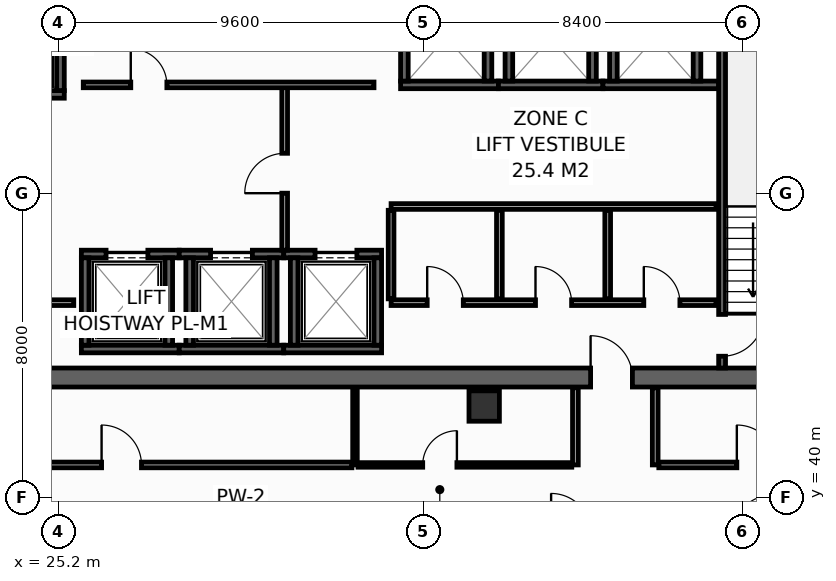
"""IFC4 building model, lengths in metres.
Left out: names, types, materials, properties, quantities, classifications, styles, units other than length and angle.
Written with IfcOpenShell. Run it as: python <this file> out.ifc"""

import sys

from ifc_helpers import new_model, si_unit, direction, frame, frame_2d, origin, origin_2d, place, context, subcontext, project, spatial, rectangle, hollow_rectangle, extrude, element, fill, save


model = new_model("IFC4")
c1 = context("Model", 3, precision=1e-05, world=origin(), true_north=direction((0.0, 1.0)))
c2 = subcontext(c1, "Body", "Model", "MODEL_VIEW")
j1 = project(units=[si_unit("LENGTHUNIT", "METRE"), si_unit("PLANEANGLEUNIT", "RADIAN")], contexts=[c1])
p1 = place(None, origin())
s1 = spatial("IfcSite", under=j1, at=p1, CompositionType="ELEMENT")
p2 = place(p1, origin())
s2 = spatial("IfcBuilding", under=s1, at=p2, CompositionType="ELEMENT")
p3 = place(p2, frame((0.0, 0.0, 205.6)))
s3 = spatial("IfcBuildingStorey", under=s2, at=p3, CompositionType="ELEMENT", Elevation=205.6)
p4 = place(p3, frame((13.6, 43.15, 0.0), z_axis=(0.0, 0.0, 1.0), x_axis=(1.0, 0.0, 0.0)))
e1 = element("IfcWall", 1, at=p4, inside=s3, PredefinedType="SHEAR", context=c2, shape_type="SweptSolid", body=[
    extrude(rectangle(XDim=32.7, YDim=0.5, at=frame_2d((16.35, 0.0))), origin(), (0.0, 0.0, 1.0), 3.55),
])
p5 = place(p4, frame((5.4, 0.0, 0.0)))
e2 = element("IfcOpeningElement", 2, at=p5, cuts=e1, PredefinedType="OPENING", context=c2, shape_type="SweptSolid", body=[
    extrude(rectangle(XDim=1.1, YDim=2.15, at=frame_2d((0.55, 1.075))), frame((0.0, 0.26, 0.0), z_axis=(0.0, -1.0, 0.0), x_axis=(1.0, 0.0, 0.0)), (0.0, 0.0, 1.0), 0.52),
])
p6 = place(p4, frame((25.6, 0.0, 0.0)))
e3 = element("IfcOpeningElement", 3, at=p6, cuts=e1, PredefinedType="OPENING", context=c2, shape_type="SweptSolid", body=[
    extrude(rectangle(XDim=1.1, YDim=2.15, at=frame_2d((0.55, 1.075))), frame((0.0, 0.26, 0.0), z_axis=(0.0, -1.0, 0.0), x_axis=(1.0, 0.0, 0.0)), (0.0, 0.0, 1.0), 0.52),
])
p7 = place(p3, frame((36.4, 42.4, 0.0), z_axis=(0.0, 0.0, 1.0), x_axis=(1.0, 0.0, 0.0)))
e4 = element("IfcColumn", 4, at=p7, inside=s3, PredefinedType="COLUMN", context=c2, shape_type="SweptSolid", body=[
    extrude(hollow_rectangle(XDim=0.8, YDim=0.8, WallThickness=0.036, at=origin_2d()), origin(), (0.0, 0.0, 1.0), 3.8),
])
p8 = place(p3, frame((22.5, 50.6, 0.0), z_axis=(0.0, 0.0, 1.0), x_axis=(1.0, 0.0, 0.0)))
e5 = element("IfcWall", 5, at=p8, inside=s3, PredefinedType="SHEAR", context=c2, shape_type="SweptSolid", body=[
    extrude(rectangle(XDim=2.85, YDim=0.2, at=frame_2d((1.425, 0.0))), origin(), (0.0, 0.0, 1.0), 3.55),
])
p9 = place(p8, frame((0.925, 0.0, 0.0)))
e6 = element("IfcOpeningElement", 6, at=p9, cuts=e5, PredefinedType="OPENING", context=c2, shape_type="SweptSolid", body=[
    extrude(rectangle(XDim=1.25, YDim=2.3, at=frame_2d((0.625, 1.15))), frame((0.0, 0.11, 0.0), z_axis=(0.0, -1.0, 0.0), x_axis=(1.0, 0.0, 0.0)), (0.0, 0.0, 1.0), 0.22),
])
p10 = place(p3, frame((25.25, 50.7, 0.0), z_axis=(0.0, 0.0, 1.0), x_axis=(0.0, 1.0, 0.0)))
e7 = element("IfcWall", 7, at=p10, inside=s3, PredefinedType="SHEAR", context=c2, shape_type="SweptSolid", body=[
    extrude(rectangle(XDim=2.6, YDim=0.2, at=frame_2d((1.3, 0.0))), origin(), (0.0, 0.0, 1.0), 3.55),
])
p11 = place(p3, frame((25.8, 43.9, 0.0), z_axis=(0.0, 0.0, 1.0), x_axis=(1.0, 0.0, 0.0)))
e8 = element("IfcWall", 8, at=p11, inside=s3, PredefinedType="SHEAR", context=c2, shape_type="SweptSolid", body=[
    extrude(rectangle(XDim=2.575, YDim=0.2, at=frame_2d((1.288, 0.0))), origin(), (0.0, 0.0, 1.0), 3.55),
])
p12 = place(p3, frame((25.8, 46.4, 0.0), z_axis=(0.0, 0.0, 1.0), x_axis=(1.0, 0.0, 0.0)))
e9 = element("IfcWall", 9, at=p12, inside=s3, PredefinedType="SHEAR", context=c2, shape_type="SweptSolid", body=[
    extrude(rectangle(XDim=2.575, YDim=0.2, at=frame_2d((1.288, 0.0))), origin(), (0.0, 0.0, 1.0), 3.55),
])
p13 = place(p12, frame((0.65, 0.0, 0.0)))
e10 = element("IfcOpeningElement", 10, at=p13, cuts=e9, PredefinedType="OPENING", context=c2, shape_type="SweptSolid", body=[
    extrude(rectangle(XDim=1.1, YDim=2.2, at=frame_2d((0.55, 1.1))), frame((0.0, 0.11, 0.0), z_axis=(0.0, -1.0, 0.0), x_axis=(1.0, 0.0, 0.0)), (0.0, 0.0, 1.0), 0.22),
])
for number, where, z_axis, x_axis in (
    (11, (25.9, 44.0, 0.0), (0.0, 0.0, 1.0), (0.0, 1.0, 0.0)),
    (12, (28.1, 44.0, 0.0), (0.0, 0.0, 1.0), (0.0, 1.0, 0.0)),
):
    element("IfcWall", number, at=place(p3, frame(where, z_axis=z_axis, x_axis=x_axis)), inside=s3, PredefinedType="SHEAR", context=c2, shape_type="SweptSolid", body=[
        extrude(rectangle(XDim=2.3, YDim=0.2, at=frame_2d((1.15, 0.0))), origin(), (0.0, 0.0, 1.0), 3.55),
    ])
p14 = place(p3, frame((28.375, 43.9, 0.0), z_axis=(0.0, 0.0, 1.0), x_axis=(1.0, 0.0, 0.0)))
e13 = element("IfcWall", 13, at=p14, inside=s3, PredefinedType="SHEAR", context=c2, shape_type="SweptSolid", body=[
    extrude(rectangle(XDim=2.75, YDim=0.2, at=frame_2d((1.375, 0.0))), origin(), (0.0, 0.0, 1.0), 3.55),
])
p15 = place(p3, frame((28.375, 46.4, 0.0), z_axis=(0.0, 0.0, 1.0), x_axis=(1.0, 0.0, 0.0)))
e14 = element("IfcWall", 14, at=p15, inside=s3, PredefinedType="SHEAR", context=c2, shape_type="SweptSolid", body=[
    extrude(rectangle(XDim=2.75, YDim=0.2, at=frame_2d((1.375, 0.0))), origin(), (0.0, 0.0, 1.0), 3.55),
])
p16 = place(p15, frame((0.825, 0.0, 0.0)))
e15 = element("IfcOpeningElement", 15, at=p16, cuts=e14, PredefinedType="OPENING", context=c2, shape_type="SweptSolid", body=[
    extrude(rectangle(XDim=1.1, YDim=2.2, at=frame_2d((0.55, 1.1))), frame((0.0, 0.11, 0.0), z_axis=(0.0, -1.0, 0.0), x_axis=(1.0, 0.0, 0.0)), (0.0, 0.0, 1.0), 0.22),
])
for number, where, z_axis, x_axis in (
    (16, (28.65, 44.0, 0.0), (0.0, 0.0, 1.0), (0.0, 1.0, 0.0)),
    (17, (30.85, 44.0, 0.0), (0.0, 0.0, 1.0), (0.0, 1.0, 0.0)),
):
    element("IfcWall", number, at=place(p3, frame(where, z_axis=z_axis, x_axis=x_axis)), inside=s3, PredefinedType="SHEAR", context=c2, shape_type="SweptSolid", body=[
        extrude(rectangle(XDim=2.3, YDim=0.2, at=frame_2d((1.15, 0.0))), origin(), (0.0, 0.0, 1.0), 3.55),
    ])
p17 = place(p3, frame((31.125, 43.9, 0.0), z_axis=(0.0, 0.0, 1.0), x_axis=(1.0, 0.0, 0.0)))
e18 = element("IfcWall", 18, at=p17, inside=s3, PredefinedType="SHEAR", context=c2, shape_type="SweptSolid", body=[
    extrude(rectangle(XDim=2.575, YDim=0.2, at=frame_2d((1.288, 0.0))), origin(), (0.0, 0.0, 1.0), 3.55),
])
p18 = place(p3, frame((31.125, 46.4, 0.0), z_axis=(0.0, 0.0, 1.0), x_axis=(1.0, 0.0, 0.0)))
e19 = element("IfcWall", 19, at=p18, inside=s3, PredefinedType="SHEAR", context=c2, shape_type="SweptSolid", body=[
    extrude(rectangle(XDim=2.575, YDim=0.2, at=frame_2d((1.288, 0.0))), origin(), (0.0, 0.0, 1.0), 3.55),
])
p19 = place(p18, frame((0.825, 0.0, 0.0)))
e20 = element("IfcOpeningElement", 20, at=p19, cuts=e19, PredefinedType="OPENING", context=c2, shape_type="SweptSolid", body=[
    extrude(rectangle(XDim=1.1, YDim=2.2, at=frame_2d((0.55, 1.1))), frame((0.0, 0.11, 0.0), z_axis=(0.0, -1.0, 0.0), x_axis=(1.0, 0.0, 0.0)), (0.0, 0.0, 1.0), 0.22),
])
for number, where, z_axis, x_axis in (
    (21, (31.4, 44.0, 0.0), (0.0, 0.0, 1.0), (0.0, 1.0, 0.0)),
    (22, (33.6, 44.0, 0.0), (0.0, 0.0, 1.0), (0.0, 1.0, 0.0)),
):
    element("IfcWall", number, at=place(p3, frame(where, z_axis=z_axis, x_axis=x_axis)), inside=s3, PredefinedType="SHEAR", context=c2, shape_type="SweptSolid", body=[
        extrude(rectangle(XDim=2.3, YDim=0.2, at=frame_2d((1.15, 0.0))), origin(), (0.0, 0.0, 1.0), 3.55),
    ])
p20 = place(p3, frame((34.2, 50.85, 0.0), z_axis=(0.0, 0.0, 1.0), x_axis=(1.0, 0.0, 0.0)))
e23 = element("IfcWall", 23, at=p20, inside=s3, PredefinedType="SHEAR", context=c2, shape_type="SweptSolid", body=[
    extrude(rectangle(XDim=2.575, YDim=0.2, at=frame_2d((1.288, 0.0))), origin(), (0.0, 0.0, 1.0), 3.55),
])
for number, where, z_axis, x_axis in (
    (24, (34.3, 50.95, 0.0), (0.0, 0.0, 1.0), (0.0, 1.0, 0.0)),
    (25, (36.5, 50.95, 0.0), (0.0, 0.0, 1.0), (0.0, 1.0, 0.0)),
):
    element("IfcWall", number, at=place(p3, frame(where, z_axis=z_axis, x_axis=x_axis)), inside=s3, PredefinedType="SHEAR", context=c2, shape_type="SweptSolid", body=[
        extrude(rectangle(XDim=2.3, YDim=0.2, at=frame_2d((1.15, 0.0))), origin(), (0.0, 0.0, 1.0), 3.55),
    ])
p21 = place(p3, frame((36.775, 50.85, 0.0), z_axis=(0.0, 0.0, 1.0), x_axis=(1.0, 0.0, 0.0)))
e26 = element("IfcWall", 26, at=p21, inside=s3, PredefinedType="SHEAR", context=c2, shape_type="SweptSolid", body=[
    extrude(rectangle(XDim=2.75, YDim=0.2, at=frame_2d((1.375, 0.0))), origin(), (0.0, 0.0, 1.0), 3.55),
])
for number, where, z_axis, x_axis in (
    (27, (37.05, 50.95, 0.0), (0.0, 0.0, 1.0), (0.0, 1.0, 0.0)),
    (28, (39.25, 50.95, 0.0), (0.0, 0.0, 1.0), (0.0, 1.0, 0.0)),
):
    element("IfcWall", number, at=place(p3, frame(where, z_axis=z_axis, x_axis=x_axis)), inside=s3, PredefinedType="SHEAR", context=c2, shape_type="SweptSolid", body=[
        extrude(rectangle(XDim=2.3, YDim=0.2, at=frame_2d((1.15, 0.0))), origin(), (0.0, 0.0, 1.0), 3.55),
    ])
p22 = place(p3, frame((39.525, 50.85, 0.0), z_axis=(0.0, 0.0, 1.0), x_axis=(1.0, 0.0, 0.0)))
e29 = element("IfcWall", 29, at=p22, inside=s3, PredefinedType="SHEAR", context=c2, shape_type="SweptSolid", body=[
    extrude(rectangle(XDim=3.045, YDim=0.2, at=frame_2d((1.522, 0.0))), origin(), (0.0, 0.0, 1.0), 3.55),
])
for number, where, z_axis, x_axis in (
    (30, (39.8, 50.95, 0.0), (0.0, 0.0, 1.0), (0.0, 1.0, 0.0)),
    (31, (42.0, 50.95, 0.0), (0.0, 0.0, 1.0), (0.0, 1.0, 0.0)),
):
    element("IfcWall", number, at=place(p3, frame(where, z_axis=z_axis, x_axis=x_axis)), inside=s3, PredefinedType="SHEAR", context=c2, shape_type="SweptSolid", body=[
        extrude(rectangle(XDim=2.3, YDim=0.2, at=frame_2d((1.15, 0.0))), origin(), (0.0, 0.0, 1.0), 3.55),
    ])
p23 = place(p3, frame((42.66, 53.8, 0.0), z_axis=(0.0, 0.0, 1.0), x_axis=(0.0, -1.0, 0.0)))
e32 = element("IfcWall", 32, at=p23, inside=s3, PredefinedType="SHEAR", context=c2, shape_type="SweptSolid", body=[
    extrude(rectangle(XDim=10.4, YDim=0.18, at=frame_2d((5.2, 0.0))), origin(), (0.0, 0.0, 1.0), 3.55),
])
p24 = place(p23, frame((8.99, 0.0, 0.0)))
e33 = element("IfcOpeningElement", 33, at=p24, cuts=e32, PredefinedType="OPENING", context=c2, shape_type="SweptSolid", body=[
    extrude(rectangle(XDim=1.1, YDim=2.15, at=frame_2d((0.55, 1.075))), frame((0.0, 0.1, 0.0), z_axis=(0.0, -1.0, 0.0), x_axis=(1.0, 0.0, 0.0)), (0.0, 0.0, 1.0), 0.2),
])
p25 = place(p3, frame((22.68, 45.12, 0.0), z_axis=(0.0, 0.0, 1.0), x_axis=(1.0, 0.0, 0.0)))
e34 = element("IfcWall", 34, at=p25, inside=s3, PredefinedType="PARTITIONING", context=c2, shape_type="SweptSolid", body=[
    extrude(rectangle(XDim=2.92, YDim=0.15, at=frame_2d((1.46, 0.0))), origin(), (0.0, 0.0, 1.0), 3.55),
])
p26 = place(p25, frame((0.85, 0.0, 0.0)))
e35 = element("IfcOpeningElement", 35, at=p26, cuts=e34, PredefinedType="OPENING", context=c2, shape_type="SweptSolid", body=[
    extrude(rectangle(XDim=1.1, YDim=2.15, at=frame_2d((0.55, 1.075))), frame((0.0, 0.085, 0.0), z_axis=(0.0, -1.0, 0.0), x_axis=(1.0, 0.0, 0.0)), (0.0, 0.0, 1.0), 0.17),
])
p27 = place(p3, frame((31.15, 46.5, 0.0), z_axis=(0.0, 0.0, 1.0), x_axis=(0.0, 1.0, 0.0)))
e36 = element("IfcWall", 36, at=p27, inside=s3, PredefinedType="PARTITIONING", context=c2, shape_type="SweptSolid", body=[
    extrude(rectangle(XDim=4.35, YDim=0.15, at=frame_2d((2.175, 0.0))), origin(), (0.0, 0.0, 1.0), 3.55),
])
p28 = place(p27, frame((1.5, 0.0, 0.0)))
e37 = element("IfcOpeningElement", 37, at=p28, cuts=e36, PredefinedType="OPENING", context=c2, shape_type="SweptSolid", body=[
    extrude(rectangle(XDim=1.05, YDim=2.15, at=frame_2d((0.525, 1.075))), frame((0.0, 0.085, 0.0), z_axis=(0.0, -1.0, 0.0), x_axis=(1.0, 0.0, 0.0)), (0.0, 0.0, 1.0), 0.17),
])
p29 = place(p3, frame((33.95, 45.12, 0.0), z_axis=(0.0, 0.0, 1.0), x_axis=(1.0, 0.0, 0.0)))
e38 = element("IfcWall", 38, at=p29, inside=s3, PredefinedType="PARTITIONING", context=c2, shape_type="SweptSolid", body=[
    extrude(rectangle(XDim=8.55, YDim=0.15, at=frame_2d((4.275, 0.0))), origin(), (0.0, 0.0, 1.0), 3.55),
])
p30 = place(p29, frame((0.95, 0.0, 0.0)))
e39 = element("IfcOpeningElement", 39, at=p30, cuts=e38, PredefinedType="OPENING", context=c2, shape_type="SweptSolid", body=[
    extrude(rectangle(XDim=0.95, YDim=2.15, at=frame_2d((0.475, 1.075))), frame((0.0, 0.085, 0.0), z_axis=(0.0, -1.0, 0.0), x_axis=(1.0, 0.0, 0.0)), (0.0, 0.0, 1.0), 0.17),
])
p31 = place(p29, frame((3.8, 0.0, 0.0)))
e40 = element("IfcOpeningElement", 40, at=p31, cuts=e38, PredefinedType="OPENING", context=c2, shape_type="SweptSolid", body=[
    extrude(rectangle(XDim=0.95, YDim=2.15, at=frame_2d((0.475, 1.075))), frame((0.0, 0.085, 0.0), z_axis=(0.0, -1.0, 0.0), x_axis=(1.0, 0.0, 0.0)), (0.0, 0.0, 1.0), 0.17),
])
p32 = place(p29, frame((6.65, 0.0, 0.0)))
e41 = element("IfcOpeningElement", 41, at=p32, cuts=e38, PredefinedType="OPENING", context=c2, shape_type="SweptSolid", body=[
    extrude(rectangle(XDim=0.95, YDim=2.15, at=frame_2d((0.475, 1.075))), frame((0.0, 0.085, 0.0), z_axis=(0.0, -1.0, 0.0), x_axis=(1.0, 0.0, 0.0)), (0.0, 0.0, 1.0), 0.17),
])
p33 = place(p3, frame((33.95, 47.65, 0.0), z_axis=(0.0, 0.0, 1.0), x_axis=(1.0, 0.0, 0.0)))
e42 = element("IfcWall", 42, at=p33, inside=s3, PredefinedType="PARTITIONING", context=c2, shape_type="SweptSolid", body=[
    extrude(rectangle(XDim=8.55, YDim=0.15, at=frame_2d((4.275, 0.0))), origin(), (0.0, 0.0, 1.0), 3.55),
])
for number, where, z_axis, x_axis in (
    (43, (33.95, 45.22, 0.0), (0.0, 0.0, 1.0), (0.0, 1.0, 0.0)),
    (44, (36.8, 45.22, 0.0), (0.0, 0.0, 1.0), (0.0, 1.0, 0.0)),
    (45, (39.65, 45.22, 0.0), (0.0, 0.0, 1.0), (0.0, 1.0, 0.0)),
):
    element("IfcWall", number, at=place(p3, frame(where, z_axis=z_axis, x_axis=x_axis)), inside=s3, PredefinedType="PARTITIONING", context=c2, shape_type="SweptSolid", body=[
        extrude(rectangle(XDim=2.33, YDim=0.15, at=frame_2d((1.165, 0.0))), origin(), (0.0, 0.0, 1.0), 3.55),
    ])
p34 = place(p3, frame((25.85, 50.85, 0.0), z_axis=(0.0, 0.0, 1.0), x_axis=(1.0, 0.0, 0.0)))
e46 = element("IfcWall", 46, at=p34, inside=s3, PredefinedType="PARTITIONING", context=c2, shape_type="SweptSolid", body=[
    extrude(rectangle(XDim=7.65, YDim=0.15, at=frame_2d((3.825, 0.0))), origin(), (0.0, 0.0, 1.0), 3.55),
])
p35 = place(p34, frame((1.25, 0.0, 0.0)))
e47 = element("IfcOpeningElement", 47, at=p35, cuts=e46, PredefinedType="OPENING", context=c2, shape_type="SweptSolid", body=[
    extrude(rectangle(XDim=0.95, YDim=2.15, at=frame_2d((0.475, 1.075))), frame((0.0, 0.085, 0.0), z_axis=(0.0, -1.0, 0.0), x_axis=(1.0, 0.0, 0.0)), (0.0, 0.0, 1.0), 0.17),
])
for number, where, z_axis, x_axis in (
    (48, (38.8, 40.85, 0.0), (0.0, 0.0, 1.0), (0.0, 1.0, 0.0)),
    (49, (40.9, 40.85, 0.0), (0.0, 0.0, 1.0), (0.0, 1.0, 0.0)),
):
    element("IfcWall", number, at=place(p3, frame(where, z_axis=z_axis, x_axis=x_axis)), inside=s3, PredefinedType="PARTITIONING", context=c2, shape_type="SweptSolid", body=[
        extrude(rectangle(XDim=2.03, YDim=0.15, at=frame_2d((1.015, 0.0))), origin(), (0.0, 0.0, 1.0), 3.55),
    ])
p36 = place(p3, frame((33.0, 40.85, 0.0), z_axis=(0.0, 0.0, 1.0), x_axis=(0.0, 1.0, 0.0)))
e50 = element("IfcWall", 50, at=p36, inside=s3, PredefinedType="PARTITIONING", context=c2, shape_type="SweptSolid", body=[
    extrude(rectangle(XDim=2.03, YDim=0.12, at=frame_2d((1.015, 0.0))), origin(), (0.0, 0.0, 1.0), 2.835),
])
p37 = place(p3, frame((20.795, 40.85, 0.0), z_axis=(0.0, 0.0, 1.0), x_axis=(1.0, 0.0, 0.0)))
e51 = element("IfcWall", 51, at=p37, inside=s3, PredefinedType="PARTITIONING", context=c2, shape_type="SweptSolid", body=[
    extrude(rectangle(XDim=12.125, YDim=0.15, at=frame_2d((6.062, 0.0))), origin(), (0.0, 0.0, 1.0), 2.835),
])
p38 = place(p37, frame((5.537, 0.0, 0.0)))
e52 = element("IfcOpeningElement", 52, at=p38, cuts=e51, PredefinedType="OPENING", context=c2, shape_type="SweptSolid", body=[
    extrude(rectangle(XDim=1.05, YDim=2.15, at=frame_2d((0.525, 1.075))), frame((0.0, 0.085, 0.0), z_axis=(0.0, -1.0, 0.0), x_axis=(1.0, 0.0, 0.0)), (0.0, 0.0, 1.0), 0.17),
])
p39 = place(p3, frame((33.08, 40.85, 0.0), z_axis=(0.0, 0.0, 1.0), x_axis=(1.0, 0.0, 0.0)))
e53 = element("IfcWall", 53, at=p39, inside=s3, PredefinedType="PARTITIONING", context=c2, shape_type="SweptSolid", body=[
    extrude(rectangle(XDim=5.625, YDim=0.12, at=frame_2d((2.812, 0.0))), origin(), (0.0, 0.0, 1.0), 2.835),
])
p40 = place(p39, frame((1.702, 0.0, 0.0)))
e54 = element("IfcOpeningElement", 54, at=p40, cuts=e53, PredefinedType="OPENING", context=c2, shape_type="SweptSolid", body=[
    extrude(rectangle(XDim=0.9, YDim=2.1, at=frame_2d((0.45, 1.05))), frame((0.0, 0.07, 0.0), z_axis=(0.0, -1.0, 0.0), x_axis=(1.0, 0.0, 0.0)), (0.0, 0.0, 1.0), 0.14),
])
p41 = place(p3, frame((40.995, 40.85, 0.0), z_axis=(0.0, 0.0, 1.0), x_axis=(1.0, 0.0, 0.0)))
e55 = element("IfcWall", 55, at=p41, inside=s3, PredefinedType="PARTITIONING", context=c2, shape_type="SweptSolid", body=[
    extrude(rectangle(XDim=5.155, YDim=0.15, at=frame_2d((2.577, 0.0))), origin(), (0.0, 0.0, 1.0), 3.55),
])
p42 = place(p41, frame((2.053, 0.0, 0.0)))
e56 = element("IfcOpeningElement", 56, at=p42, cuts=e55, PredefinedType="OPENING", context=c2, shape_type="SweptSolid", body=[
    extrude(rectangle(XDim=1.05, YDim=2.15, at=frame_2d((0.525, 1.075))), frame((0.0, 0.085, 0.0), z_axis=(0.0, -1.0, 0.0), x_axis=(1.0, 0.0, 0.0)), (0.0, 0.0, 1.0), 0.17),
])
p43 = place(p13, origin())
e57 = element("IfcDoor", 57, at=p43, inside=s3, OperationType="SLIDING_TO_LEFT", PredefinedType="DOOR", context=c2, shape_type="SweptSolid", body=[
    extrude(rectangle(XDim=1.1, YDim=2.2, at=frame_2d((0.55, 1.1))), frame((0.0, 0.025, 0.0), z_axis=(0.0, -1.0, 0.0), x_axis=(1.0, 0.0, 0.0)), (0.0, 0.0, 1.0), 0.05),
])
fill(e10, e57)
p44 = place(p16, origin())
e58 = element("IfcDoor", 58, at=p44, inside=s3, OperationType="SLIDING_TO_LEFT", PredefinedType="DOOR", context=c2, shape_type="SweptSolid", body=[
    extrude(rectangle(XDim=1.1, YDim=2.2, at=frame_2d((0.55, 1.1))), frame((0.0, 0.025, 0.0), z_axis=(0.0, -1.0, 0.0), x_axis=(1.0, 0.0, 0.0)), (0.0, 0.0, 1.0), 0.05),
])
fill(e15, e58)
p45 = place(p19, origin())
e59 = element("IfcDoor", 59, at=p45, inside=s3, OperationType="SLIDING_TO_LEFT", PredefinedType="DOOR", context=c2, shape_type="SweptSolid", body=[
    extrude(rectangle(XDim=1.1, YDim=2.2, at=frame_2d((0.55, 1.1))), frame((0.0, 0.025, 0.0), z_axis=(0.0, -1.0, 0.0), x_axis=(1.0, 0.0, 0.0)), (0.0, 0.0, 1.0), 0.05),
])
fill(e20, e59)
p46 = place(p24, origin())
e60 = element("IfcDoor", 60, at=p46, inside=s3, OperationType="SINGLE_SWING_LEFT", PredefinedType="DOOR", context=c2, shape_type="SweptSolid", body=[
    extrude(rectangle(XDim=1.1, YDim=2.15, at=frame_2d((0.55, 1.075))), frame((0.0, 0.025, 0.0), z_axis=(0.0, -1.0, 0.0), x_axis=(1.0, 0.0, 0.0)), (0.0, 0.0, 1.0), 0.05),
])
fill(e33, e60)
p47 = place(p6, origin())
e61 = element("IfcDoor", 61, at=p47, inside=s3, OperationType="SINGLE_SWING_LEFT", PredefinedType="DOOR", context=c2, shape_type="SweptSolid", body=[
    extrude(rectangle(XDim=1.1, YDim=2.15, at=frame_2d((0.55, 1.075))), frame((0.0, 0.025, 0.0), z_axis=(0.0, -1.0, 0.0), x_axis=(1.0, 0.0, 0.0)), (0.0, 0.0, 1.0), 0.05),
])
fill(e3, e61)
p48 = place(p28, origin())
e62 = element("IfcDoor", 62, at=p48, inside=s3, OperationType="SINGLE_SWING_LEFT", PredefinedType="DOOR", context=c2, shape_type="SweptSolid", body=[
    extrude(rectangle(XDim=1.05, YDim=2.15, at=frame_2d((0.525, 1.075))), frame((0.0, 0.025, 0.0), z_axis=(0.0, -1.0, 0.0), x_axis=(1.0, 0.0, 0.0)), (0.0, 0.0, 1.0), 0.05),
])
fill(e37, e62)
p49 = place(p30, origin())
e63 = element("IfcDoor", 63, at=p49, inside=s3, OperationType="SINGLE_SWING_LEFT", PredefinedType="DOOR", context=c2, shape_type="SweptSolid", body=[
    extrude(rectangle(XDim=0.95, YDim=2.15, at=frame_2d((0.475, 1.075))), frame((0.0, 0.025, 0.0), z_axis=(0.0, -1.0, 0.0), x_axis=(1.0, 0.0, 0.0)), (0.0, 0.0, 1.0), 0.05),
])
fill(e39, e63)
p50 = place(p31, origin())
e64 = element("IfcDoor", 64, at=p50, inside=s3, OperationType="SINGLE_SWING_LEFT", PredefinedType="DOOR", context=c2, shape_type="SweptSolid", body=[
    extrude(rectangle(XDim=0.95, YDim=2.15, at=frame_2d((0.475, 1.075))), frame((0.0, 0.025, 0.0), z_axis=(0.0, -1.0, 0.0), x_axis=(1.0, 0.0, 0.0)), (0.0, 0.0, 1.0), 0.05),
])
fill(e40, e64)
p51 = place(p32, origin())
e65 = element("IfcDoor", 65, at=p51, inside=s3, OperationType="SINGLE_SWING_LEFT", PredefinedType="DOOR", context=c2, shape_type="SweptSolid", body=[
    extrude(rectangle(XDim=0.95, YDim=2.15, at=frame_2d((0.475, 1.075))), frame((0.0, 0.025, 0.0), z_axis=(0.0, -1.0, 0.0), x_axis=(1.0, 0.0, 0.0)), (0.0, 0.0, 1.0), 0.05),
])
fill(e41, e65)
p52 = place(p35, origin())
e66 = element("IfcDoor", 66, at=p52, inside=s3, OperationType="SINGLE_SWING_LEFT", PredefinedType="DOOR", context=c2, shape_type="SweptSolid", body=[
    extrude(rectangle(XDim=0.95, YDim=2.15, at=frame_2d((0.475, 1.075))), frame((0.0, 0.025, 0.0), z_axis=(0.0, -1.0, 0.0), x_axis=(1.0, 0.0, 0.0)), (0.0, 0.0, 1.0), 0.05),
])
fill(e47, e66)
p53 = place(p38, origin())
e67 = element("IfcDoor", 67, at=p53, inside=s3, OperationType="SINGLE_SWING_LEFT", PredefinedType="DOOR", context=c2, shape_type="SweptSolid", body=[
    extrude(rectangle(XDim=1.05, YDim=2.15, at=frame_2d((0.525, 1.075))), frame((0.0, 0.025, 0.0), z_axis=(0.0, -1.0, 0.0), x_axis=(1.0, 0.0, 0.0)), (0.0, 0.0, 1.0), 0.05),
])
fill(e52, e67)
p54 = place(p40, origin())
e68 = element("IfcDoor", 68, at=p54, inside=s3, OperationType="SINGLE_SWING_RIGHT", PredefinedType="DOOR", context=c2, shape_type="SweptSolid", body=[
    extrude(rectangle(XDim=0.9, YDim=2.1, at=frame_2d((0.45, 1.05))), frame((0.0, 0.025, 0.0), z_axis=(0.0, -1.0, 0.0), x_axis=(1.0, 0.0, 0.0)), (0.0, 0.0, 1.0), 0.05),
])
fill(e54, e68)
p55 = place(p42, origin())
e69 = element("IfcDoor", 69, at=p55, inside=s3, OperationType="SINGLE_SWING_LEFT", PredefinedType="DOOR", context=c2, shape_type="SweptSolid", body=[
    extrude(rectangle(XDim=1.05, YDim=2.15, at=frame_2d((0.525, 1.075))), frame((0.0, 0.025, 0.0), z_axis=(0.0, -1.0, 0.0), x_axis=(1.0, 0.0, 0.0)), (0.0, 0.0, 1.0), 0.05),
])
fill(e56, e69)
save(model, sys.argv[1])
